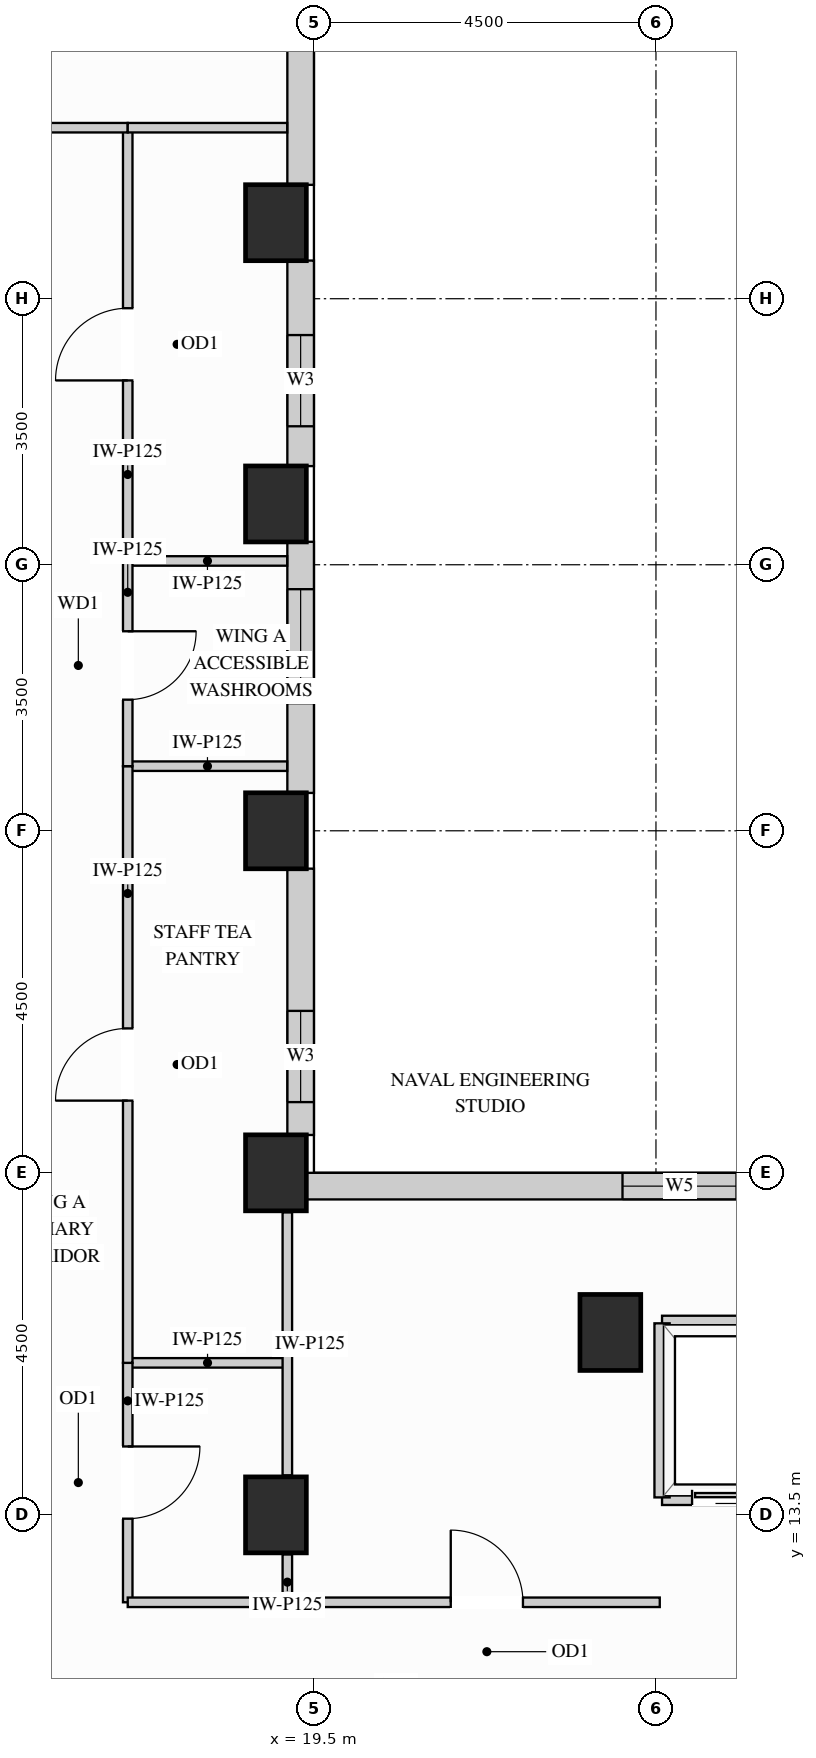
"""IFC4 building model, lengths in metres.
Left out: names, types, materials, properties, quantities, classifications, styles, units other than length and angle.
Written with IfcOpenShell. Run it as: python <this file> out.ifc"""

import sys

from ifc_helpers import new_model, si_unit, direction, frame, frame_2d, origin, origin_2d, place, context, subcontext, project, spatial, rectangle, extrude, source, transform, mapped, element, fill, save


model = new_model("IFC4")
c1 = context("Model", 3, precision=1e-05, world=origin(), true_north=direction((0.0, 1.0)))
c2 = subcontext(c1, "Body", "Model", "MODEL_VIEW")
j1 = project(units=[si_unit("LENGTHUNIT", "METRE"), si_unit("PLANEANGLEUNIT", "RADIAN")], contexts=[c1])
p1 = place(None, origin())
s1 = spatial("IfcSite", under=j1, at=p1, CompositionType="ELEMENT")
p2 = place(p1, origin())
s2 = spatial("IfcBuilding", under=s1, at=p2, CompositionType="ELEMENT")
p3 = place(p2, frame((0.0, 0.0, 150.3)))
s3 = spatial("IfcBuildingStorey", under=s2, at=p3, CompositionType="ELEMENT", Elevation=150.3)
m1 = source(origin(), c2, "Body", "SweptSolid", [
    extrude(rectangle(XDim=0.8, YDim=1.0, at=origin_2d()), origin(), (0.0, 0.0, 1.0), 3.4),
])
for number, where, z_axis, x_axis in (
    (1, (19.0, 13.5, 0.0), (0.0, 0.0, 1.0), (1.0, 0.0, 0.0)),
    (2, (19.0, 18.0, 0.0), (0.0, 0.0, 1.0), (1.0, 0.0, 0.0)),
    (3, (19.0, 22.5, 0.0), (0.0, 0.0, 1.0), (1.0, 0.0, 0.0)),
    (4, (19.0, 26.8, 0.0), (0.0, 0.0, 1.0), (1.0, 0.0, 0.0)),
    (5, (19.0, 30.5, 0.0), (0.0, 0.0, 1.0), (1.0, 0.0, 0.0)),
    (6, (23.4, 15.9, 0.0), (0.0, 0.0, 1.0), (1.0, 0.0, 0.0)),
):
    element("IfcColumn", number, at=place(p3, frame(where, z_axis=z_axis, x_axis=x_axis)), inside=s3, PredefinedType="COLUMN", context=c2, shape_type="MappedRepresentation", body=[
        mapped(m1, transform((0.0, 0.0, 0.0), x_axis=(1.0, 0.0, 0.0), y_axis=(0.0, 1.0, 0.0), z_axis=(0.0, 0.0, 1.0))),
    ])
p4 = place(p3, frame((34.502, 17.825, 0.0), z_axis=(0.0, 0.0, 1.0), x_axis=(-1.0, 0.0, 0.0)))
e7 = element("IfcWall", 7, at=p4, inside=s3, PredefinedType="SOLIDWALL", context=c2, shape_type="SweptSolid", body=[
    extrude(rectangle(XDim=15.104, YDim=0.35, at=frame_2d((7.552, 0.0))), origin(), (0.0, 0.0, 1.0), 3.385),
])
p5 = place(p4, frame((4.131, 0.0, 0.78)))
e8 = element("IfcOpeningElement", 8, at=p5, cuts=e7, PredefinedType="OPENING", context=c2, shape_type="SweptSolid", body=[
    extrude(rectangle(XDim=1.5, YDim=2.0, at=frame_2d((0.75, 1.0))), frame((0.0, 0.185, 0.0), z_axis=(0.0, -1.0, 0.0), x_axis=(1.0, 0.0, 0.0)), (0.0, 0.0, 1.0), 0.37),
])
p6 = place(p4, frame((9.442, 0.0, 0.78)))
e9 = element("IfcOpeningElement", 9, at=p6, cuts=e7, PredefinedType="OPENING", context=c2, shape_type="SweptSolid", body=[
    extrude(rectangle(XDim=1.5, YDim=2.0, at=frame_2d((0.75, 1.0))), frame((0.0, 0.185, 0.0), z_axis=(0.0, -1.0, 0.0), x_axis=(1.0, 0.0, 0.0)), (0.0, 0.0, 1.0), 0.37),
])
p7 = place(p3, frame((19.325, 18.498, 0.0), z_axis=(0.0, 0.0, 1.0), x_axis=(0.0, 1.0, 0.0)))
e10 = element("IfcWall", 10, at=p7, inside=s3, PredefinedType="SOLIDWALL", context=c2, shape_type="SweptSolid", body=[
    extrude(rectangle(XDim=3.504, YDim=0.35, at=frame_2d((1.752, 0.0))), origin(), (0.0, 0.0, 1.0), 2.612),
])
p8 = place(p7, frame((0.433, 0.0, 0.78)))
e11 = element("IfcOpeningElement", 11, at=p8, cuts=e10, PredefinedType="OPENING", context=c2, shape_type="SweptSolid", body=[
    extrude(rectangle(XDim=1.2, YDim=1.652, at=frame_2d((0.6, 0.826))), frame((0.0, 0.185, 0.0), z_axis=(0.0, -1.0, 0.0), x_axis=(1.0, 0.0, 0.0)), (0.0, 0.0, 1.0), 0.37),
])
p9 = place(p3, frame((19.325, 22.998, 0.0), z_axis=(0.0, 0.0, 1.0), x_axis=(0.0, 1.0, 0.0)))
e12 = element("IfcWall", 12, at=p9, inside=s3, PredefinedType="SOLIDWALL", context=c2, shape_type="SweptSolid", body=[
    extrude(rectangle(XDim=3.304, YDim=0.35, at=frame_2d((1.652, 0.0))), origin(), (0.0, 0.0, 1.0), 2.612),
])
p10 = place(p9, frame((1.18, 0.0, 0.78)))
e13 = element("IfcOpeningElement", 13, at=p10, cuts=e12, PredefinedType="OPENING", context=c2, shape_type="SweptSolid", body=[
    extrude(rectangle(XDim=1.5, YDim=1.652, at=frame_2d((0.75, 0.826))), frame((0.0, 0.185, 0.0), z_axis=(0.0, -1.0, 0.0), x_axis=(1.0, 0.0, 0.0)), (0.0, 0.0, 1.0), 0.37),
])
p11 = place(p3, frame((19.325, 27.298, 0.0), z_axis=(0.0, 0.0, 1.0), x_axis=(0.0, 1.0, 0.0)))
e14 = element("IfcWall", 14, at=p11, inside=s3, PredefinedType="SOLIDWALL", context=c2, shape_type="SweptSolid", body=[
    extrude(rectangle(XDim=2.704, YDim=0.35, at=frame_2d((1.352, 0.0))), origin(), (0.0, 0.0, 1.0), 2.612),
])
p12 = place(p11, frame((0.524, 0.0, 0.78)))
e15 = element("IfcOpeningElement", 15, at=p12, cuts=e14, PredefinedType="OPENING", context=c2, shape_type="SweptSolid", body=[
    extrude(rectangle(XDim=1.2, YDim=1.652, at=frame_2d((0.6, 0.826))), frame((0.0, 0.185, 0.0), z_axis=(0.0, -1.0, 0.0), x_axis=(1.0, 0.0, 0.0)), (0.0, 0.0, 1.0), 0.37),
])
m2 = source(origin(), c2, "Body", "SweptSolid", [
    extrude(rectangle(XDim=3.504, YDim=0.35, at=frame_2d((1.752, 0.0))), origin(), (0.0, 0.0, 1.0), 2.612),
])
p13 = place(p3, frame((19.325, 30.998, 0.0), z_axis=(0.0, 0.0, 1.0), x_axis=(0.0, 1.0, 0.0)))
e16 = element("IfcWall", 16, at=p13, inside=s3, PredefinedType="SOLIDWALL", context=c2, shape_type="MappedRepresentation", body=[
    mapped(m2, transform((0.0, 0.0, 0.0), x_axis=(1.0, 0.0, 0.0), y_axis=(0.0, 1.0, 0.0), z_axis=(0.0, 0.0, 1.0))),
])
m3 = source(origin(), c2, "Body", "SweptSolid", [
    extrude(rectangle(XDim=2.1, YDim=0.125, at=frame_2d((1.05, 0.0))), origin(), (0.0, 0.0, 1.0), 3.385),
])
p14 = place(p3, frame((17.05, 15.5, 0.0), z_axis=(0.0, 0.0, 1.0), x_axis=(1.0, 0.0, 0.0)))
e17 = element("IfcWall", 17, at=p14, inside=s3, PredefinedType="PARTITIONING", context=c2, shape_type="MappedRepresentation", body=[
    mapped(m3, transform((0.0, 0.0, 0.0), x_axis=(1.0, 0.0, 0.0), y_axis=(0.0, 1.0, 0.0), z_axis=(0.0, 0.0, 1.0))),
])
m4 = source(origin(), c2, "Body", "SweptSolid", [
    extrude(rectangle(XDim=2.098, YDim=0.125, at=frame_2d((1.049, 0.0))), origin(), (0.0, 0.0, 1.0), 3.385),
])
for number, where, z_axis, x_axis in (
    (18, (17.05, 23.35, 0.0), (0.0, 0.0, 1.0), (1.0, 0.0, 0.0)),
    (19, (17.05, 26.05, 0.0), (0.0, 0.0, 1.0), (1.0, 0.0, 0.0)),
):
    element("IfcWall", number, at=place(p3, frame(where, z_axis=z_axis, x_axis=x_axis)), inside=s3, PredefinedType="PARTITIONING", context=c2, shape_type="MappedRepresentation", body=[
        mapped(m4, transform((0.0, 0.0, 0.0), x_axis=(1.0, 0.0, 0.0), y_axis=(0.0, 1.0, 0.0), z_axis=(0.0, 0.0, 1.0))),
    ])
m5 = source(origin(), c2, "Body", "SweptSolid", [
    extrude(rectangle(XDim=0.63, YDim=0.125, at=frame_2d((0.315, 0.0))), origin(), (0.0, 0.0, 1.0), 2.773),
])
p15 = place(p3, frame((19.15, 12.35, 0.0), z_axis=(0.0, 0.0, 1.0), x_axis=(0.0, 1.0, 0.0)))
e20 = element("IfcWall", 20, at=p15, inside=s3, PredefinedType="PARTITIONING", context=c2, shape_type="MappedRepresentation", body=[
    mapped(m5, transform((0.0, 0.0, 0.0), x_axis=(1.0, 0.0, 0.0), y_axis=(0.0, 1.0, 0.0), z_axis=(0.0, 0.0, 1.0))),
])
m6 = source(origin(), c2, "Body", "SweptSolid", [
    extrude(rectangle(XDim=3.46, YDim=0.125, at=frame_2d((1.73, 0.0))), origin(), (0.0, 0.0, 1.0), 2.773),
])
p16 = place(p3, frame((19.15, 14.02, 0.0), z_axis=(0.0, 0.0, 1.0), x_axis=(0.0, 1.0, 0.0)))
e21 = element("IfcWall", 21, at=p16, inside=s3, PredefinedType="PARTITIONING", context=c2, shape_type="MappedRepresentation", body=[
    mapped(m6, transform((0.0, 0.0, 0.0), x_axis=(1.0, 0.0, 0.0), y_axis=(0.0, 1.0, 0.0), z_axis=(0.0, 0.0, 1.0))),
])
p17 = place(p3, frame((17.05, 12.35, 0.0), z_axis=(0.0, 0.0, 1.0), x_axis=(0.0, 1.0, 0.0)))
e22 = element("IfcWall", 22, at=p17, inside=s3, PredefinedType="PARTITIONING", context=c2, shape_type="SweptSolid", body=[
    extrude(rectangle(XDim=3.15, YDim=0.125, at=frame_2d((1.575, 0.0))), origin(), (0.0, 0.0, 1.0), 3.385),
])
p18 = place(p17, frame((1.1, 0.0, 0.0)))
e23 = element("IfcOpeningElement", 23, at=p18, cuts=e22, PredefinedType="OPENING", context=c2, shape_type="SweptSolid", body=[
    extrude(rectangle(XDim=0.95, YDim=2.15, at=frame_2d((0.475, 1.075))), frame((0.0, 0.073, 0.0), z_axis=(0.0, -1.0, 0.0), x_axis=(1.0, 0.0, 0.0)), (0.0, 0.0, 1.0), 0.145),
])
p19 = place(p3, frame((17.05, 15.5, 0.0), z_axis=(0.0, 0.0, 1.0), x_axis=(0.0, 1.0, 0.0)))
e24 = element("IfcWall", 24, at=p19, inside=s3, PredefinedType="PARTITIONING", context=c2, shape_type="SweptSolid", body=[
    extrude(rectangle(XDim=7.85, YDim=0.125, at=frame_2d((3.925, 0.0))), origin(), (0.0, 0.0, 1.0), 3.385),
])
p20 = place(p19, frame((3.45, 0.0, 0.0)))
e25 = element("IfcOpeningElement", 25, at=p20, cuts=e24, PredefinedType="OPENING", context=c2, shape_type="SweptSolid", body=[
    extrude(rectangle(XDim=0.95, YDim=2.15, at=frame_2d((0.475, 1.075))), frame((0.0, 0.073, 0.0), z_axis=(0.0, -1.0, 0.0), x_axis=(1.0, 0.0, 0.0)), (0.0, 0.0, 1.0), 0.145),
])
p21 = place(p3, frame((17.05, 26.05, 0.0), z_axis=(0.0, 0.0, 1.0), x_axis=(0.0, 1.0, 0.0)))
e26 = element("IfcWall", 26, at=p21, inside=s3, PredefinedType="PARTITIONING", context=c2, shape_type="SweptSolid", body=[
    extrude(rectangle(XDim=5.7, YDim=0.125, at=frame_2d((2.85, 0.0))), origin(), (0.0, 0.0, 1.0), 3.385),
])
p22 = place(p21, frame((2.375, 0.0, 0.0)))
e27 = element("IfcOpeningElement", 27, at=p22, cuts=e26, PredefinedType="OPENING", context=c2, shape_type="SweptSolid", body=[
    extrude(rectangle(XDim=0.95, YDim=2.15, at=frame_2d((0.475, 1.075))), frame((0.0, 0.073, 0.0), z_axis=(0.0, -1.0, 0.0), x_axis=(1.0, 0.0, 0.0)), (0.0, 0.0, 1.0), 0.145),
])
p23 = place(p3, frame((17.05, 23.35, 0.0), z_axis=(0.0, 0.0, 1.0), x_axis=(0.0, 1.0, 0.0)))
e28 = element("IfcWall", 28, at=p23, inside=s3, PredefinedType="PARTITIONING", context=c2, shape_type="SweptSolid", body=[
    extrude(rectangle(XDim=2.7, YDim=0.125, at=frame_2d((1.35, 0.0))), origin(), (0.0, 0.0, 1.0), 3.385),
])
p24 = place(p23, frame((0.875, 0.0, 0.0)))
e29 = element("IfcOpeningElement", 29, at=p24, cuts=e28, PredefinedType="OPENING", context=c2, shape_type="SweptSolid", body=[
    extrude(rectangle(XDim=0.9, YDim=2.15, at=frame_2d((0.45, 1.075))), frame((0.0, 0.073, 0.0), z_axis=(0.0, -1.0, 0.0), x_axis=(1.0, 0.0, 0.0)), (0.0, 0.0, 1.0), 0.145),
])
p25 = place(p3, frame((11.916, 31.75, 0.0), z_axis=(0.0, 0.0, 1.0), x_axis=(1.0, 0.0, 0.0)))
e30 = element("IfcWall", 30, at=p25, inside=s3, PredefinedType="PARTITIONING", context=c2, shape_type="SweptSolid", body=[
    extrude(rectangle(XDim=5.134, YDim=0.125, at=frame_2d((2.567, 0.0))), origin(), (0.0, 0.0, 1.0), 2.848),
])
p26 = place(p25, frame((2.092, 0.0, 0.0)))
e31 = element("IfcOpeningElement", 31, at=p26, cuts=e30, PredefinedType="OPENING", context=c2, shape_type="SweptSolid", body=[
    extrude(rectangle(XDim=0.95, YDim=2.15, at=frame_2d((0.475, 1.075))), frame((0.0, 0.073, 0.0), z_axis=(0.0, -1.0, 0.0), x_axis=(1.0, 0.0, 0.0)), (0.0, 0.0, 1.0), 0.145),
])
m7 = source(origin(), c2, "Body", "SweptSolid", [
    extrude(rectangle(XDim=2.098, YDim=0.125, at=frame_2d((1.049, 0.0))), origin(), (0.0, 0.0, 1.0), 2.848),
])
p27 = place(p3, frame((17.05, 31.75, 0.0), z_axis=(0.0, 0.0, 1.0), x_axis=(1.0, 0.0, 0.0)))
e32 = element("IfcWall", 32, at=p27, inside=s3, PredefinedType="PARTITIONING", context=c2, shape_type="MappedRepresentation", body=[
    mapped(m7, transform((0.0, 0.0, 0.0), x_axis=(1.0, 0.0, 0.0), y_axis=(0.0, 1.0, 0.0), z_axis=(0.0, 0.0, 1.0))),
])
m8 = source(origin(), c2, "Body", "SweptSolid", [
    extrude(rectangle(XDim=2.45, YDim=0.125, at=frame_2d((1.225, 0.0))), origin(), (0.0, 0.0, 1.0), 3.385),
])
p28 = place(p3, frame((17.05, 12.35, 0.0), z_axis=(0.0, 0.0, 1.0), x_axis=(1.0, 0.0, 0.0)))
e33 = element("IfcWall", 33, at=p28, inside=s3, PredefinedType="PARTITIONING", context=c2, shape_type="MappedRepresentation", body=[
    mapped(m8, transform((0.0, 0.0, 0.0), x_axis=(1.0, 0.0, 0.0), y_axis=(0.0, 1.0, 0.0), z_axis=(0.0, 0.0, 1.0))),
])
p29 = place(p3, frame((19.5, 12.35, 0.0), z_axis=(0.0, 0.0, 1.0), x_axis=(1.0, 0.0, 0.0)))
e34 = element("IfcWall", 34, at=p29, inside=s3, PredefinedType="PARTITIONING", context=c2, shape_type="SweptSolid", body=[
    extrude(rectangle(XDim=4.55, YDim=0.125, at=frame_2d((2.275, 0.0))), origin(), (0.0, 0.0, 1.0), 3.385),
])
p30 = place(p29, frame((1.8, 0.0, 0.0)))
e35 = element("IfcOpeningElement", 35, at=p30, cuts=e34, PredefinedType="OPENING", context=c2, shape_type="SweptSolid", body=[
    extrude(rectangle(XDim=0.95, YDim=2.15, at=frame_2d((0.475, 1.075))), frame((0.0, 0.073, 0.0), z_axis=(0.0, -1.0, 0.0), x_axis=(1.0, 0.0, 0.0)), (0.0, 0.0, 1.0), 0.145),
])
m9 = source(origin(), c2, "Body", "SweptSolid", [
    extrude(rectangle(XDim=1.89, YDim=0.2, at=frame_2d((0.945, 0.0))), origin(), (0.0, 0.0, 1.0), 2.773),
])
p31 = place(p3, frame((24.08, 16.02, 0.0), z_axis=(0.0, 0.0, 1.0), x_axis=(1.0, 0.0, 0.0)))
e36 = element("IfcWall", 36, at=p31, inside=s3, PredefinedType="PARTITIONING", context=c2, shape_type="MappedRepresentation", body=[
    mapped(m9, transform((0.0, 0.0, 0.0), x_axis=(1.0, 0.0, 0.0), y_axis=(0.0, 1.0, 0.0), z_axis=(0.0, 0.0, 1.0))),
])
p32 = place(p3, frame((24.08, 13.73, 0.0), z_axis=(0.0, 0.0, 1.0), x_axis=(1.0, 0.0, 0.0)))
e37 = element("IfcWall", 37, at=p32, inside=s3, PredefinedType="PARTITIONING", context=c2, shape_type="SweptSolid", body=[
    extrude(rectangle(XDim=1.89, YDim=0.2, at=frame_2d((0.945, 0.0))), origin(), (0.0, 0.0, 1.0), 2.466),
])
p33 = place(p32, frame((0.395, 0.0, 0.0)))
e38 = element("IfcOpeningElement", 38, at=p33, cuts=e37, PredefinedType="OPENING", context=c2, shape_type="SweptSolid", body=[
    extrude(rectangle(XDim=1.1, YDim=2.2, at=frame_2d((0.55, 1.1))), frame((0.0, 0.11, 0.0), z_axis=(0.0, -1.0, 0.0), x_axis=(1.0, 0.0, 0.0)), (0.0, 0.0, 1.0), 0.22),
])
m10 = source(origin(), c2, "Body", "SweptSolid", [
    extrude(rectangle(XDim=2.29, YDim=0.2, at=frame_2d((1.145, 0.0))), origin(), (0.0, 0.0, 1.0), 3.385),
])
p34 = place(p3, frame((24.08, 13.73, 0.0), z_axis=(0.0, 0.0, 1.0), x_axis=(0.0, 1.0, 0.0)))
e39 = element("IfcWall", 39, at=p34, inside=s3, PredefinedType="PARTITIONING", context=c2, shape_type="MappedRepresentation", body=[
    mapped(m10, transform((0.0, 0.0, 0.0), x_axis=(1.0, 0.0, 0.0), y_axis=(0.0, 1.0, 0.0), z_axis=(0.0, 0.0, 1.0))),
])
m11 = source(origin(), c2, "Body", "SweptSolid", [
    extrude(rectangle(XDim=1.1, YDim=2.2, at=frame_2d((0.55, 1.1))), frame((0.0, 0.025, 0.0), z_axis=(0.0, -1.0, 0.0), x_axis=(1.0, 0.0, 0.0)), (0.0, 0.0, 1.0), 0.05),
])
p35 = place(p33, origin())
e40 = element("IfcDoor", 40, at=p35, inside=s3, OperationType="SLIDING_TO_LEFT", PredefinedType="DOOR", context=c2, shape_type="MappedRepresentation", body=[
    mapped(m11, transform((0.0, 0.0, 0.0), x_axis=(1.0, 0.0, 0.0), y_axis=(0.0, 1.0, 0.0), z_axis=(0.0, 0.0, 1.0))),
])
fill(e38, e40)
m12 = source(origin(), c2, "Body", "SweptSolid", [
    extrude(rectangle(XDim=0.95, YDim=2.15, at=frame_2d((0.475, 1.075))), frame((0.0, 0.025, 0.0), z_axis=(0.0, -1.0, 0.0), x_axis=(1.0, 0.0, 0.0)), (0.0, 0.0, 1.0), 0.05),
])
p36 = place(p18, origin())
e41 = element("IfcDoor", 41, at=p36, inside=s3, OperationType="SINGLE_SWING_RIGHT", PredefinedType="DOOR", context=c2, shape_type="MappedRepresentation", body=[
    mapped(m12, transform((0.0, 0.0, 0.0), x_axis=(1.0, 0.0, 0.0), y_axis=(0.0, 1.0, 0.0), z_axis=(0.0, 0.0, 1.0))),
])
fill(e23, e41)
p37 = place(p20, origin())
e42 = element("IfcDoor", 42, at=p37, inside=s3, OperationType="SINGLE_SWING_LEFT", PredefinedType="DOOR", context=c2, shape_type="MappedRepresentation", body=[
    mapped(m12, transform((0.0, 0.0, 0.0), x_axis=(1.0, 0.0, 0.0), y_axis=(0.0, 1.0, 0.0), z_axis=(0.0, 0.0, 1.0))),
])
fill(e25, e42)
p38 = place(p22, origin())
e43 = element("IfcDoor", 43, at=p38, inside=s3, OperationType="SINGLE_SWING_LEFT", PredefinedType="DOOR", context=c2, shape_type="MappedRepresentation", body=[
    mapped(m12, transform((0.0, 0.0, 0.0), x_axis=(1.0, 0.0, 0.0), y_axis=(0.0, 1.0, 0.0), z_axis=(0.0, 0.0, 1.0))),
])
fill(e27, e43)
p39 = place(p30, origin())
e44 = element("IfcDoor", 44, at=p39, inside=s3, OperationType="SINGLE_SWING_LEFT", PredefinedType="DOOR", context=c2, shape_type="MappedRepresentation", body=[
    mapped(m12, transform((0.0, 0.0, 0.0), x_axis=(1.0, 0.0, 0.0), y_axis=(0.0, 1.0, 0.0), z_axis=(0.0, 0.0, 1.0))),
])
fill(e35, e44)
m13 = source(origin(), c2, "Body", "SweptSolid", [
    extrude(rectangle(XDim=0.9, YDim=2.15, at=frame_2d((0.45, 1.075))), frame((0.0, 0.025, 0.0), z_axis=(0.0, -1.0, 0.0), x_axis=(1.0, 0.0, 0.0)), (0.0, 0.0, 1.0), 0.05),
])
p40 = place(p24, origin())
e45 = element("IfcDoor", 45, at=p40, inside=s3, OperationType="SINGLE_SWING_RIGHT", PredefinedType="DOOR", context=c2, shape_type="MappedRepresentation", body=[
    mapped(m13, transform((0.0, 0.0, 0.0), x_axis=(1.0, 0.0, 0.0), y_axis=(0.0, 1.0, 0.0), z_axis=(0.0, 0.0, 1.0))),
])
fill(e29, e45)
m14 = source(origin(), c2, "Body", "SweptSolid", [
    extrude(rectangle(XDim=1.2, YDim=1.652, at=frame_2d((0.6, 0.826))), frame((0.0, 0.03, 0.0), z_axis=(0.0, -1.0, 0.0), x_axis=(1.0, 0.0, 0.0)), (0.0, 0.0, 1.0), 0.06),
])
p41 = place(p8, origin())
e46 = element("IfcWindow", 46, at=p41, inside=s3, PartitioningType="SINGLE_PANEL", PredefinedType="WINDOW", context=c2, shape_type="MappedRepresentation", body=[
    mapped(m14, transform((0.0, 0.0, 0.0), x_axis=(1.0, 0.0, 0.0), y_axis=(0.0, 1.0, 0.0), z_axis=(0.0, 0.0, 1.0))),
])
fill(e11, e46)
p42 = place(p12, origin())
e47 = element("IfcWindow", 47, at=p42, inside=s3, PartitioningType="SINGLE_PANEL", PredefinedType="WINDOW", context=c2, shape_type="MappedRepresentation", body=[
    mapped(m14, transform((0.0, 0.0, 0.0), x_axis=(1.0, 0.0, 0.0), y_axis=(0.0, 1.0, 0.0), z_axis=(0.0, 0.0, 1.0))),
])
fill(e15, e47)
m15 = source(origin(), c2, "Body", "SweptSolid", [
    extrude(rectangle(XDim=1.5, YDim=2.0, at=frame_2d((0.75, 1.0))), frame((0.0, 0.03, 0.0), z_axis=(0.0, -1.0, 0.0), x_axis=(1.0, 0.0, 0.0)), (0.0, 0.0, 1.0), 0.06),
])
p43 = place(p6, origin())
e48 = element("IfcWindow", 48, at=p43, inside=s3, PartitioningType="SINGLE_PANEL", PredefinedType="WINDOW", context=c2, shape_type="MappedRepresentation", body=[
    mapped(m15, transform((0.0, 0.0, 0.0), x_axis=(1.0, 0.0, 0.0), y_axis=(0.0, 1.0, 0.0), z_axis=(0.0, 0.0, 1.0))),
])
fill(e9, e48)
m16 = source(origin(), c2, "Body", "SweptSolid", [
    extrude(rectangle(XDim=1.5, YDim=1.652, at=frame_2d((0.75, 0.826))), frame((0.0, 0.03, 0.0), z_axis=(0.0, -1.0, 0.0), x_axis=(1.0, 0.0, 0.0)), (0.0, 0.0, 1.0), 0.06),
])
p44 = place(p10, origin())
e49 = element("IfcWindow", 49, at=p44, inside=s3, PartitioningType="SINGLE_PANEL", PredefinedType="WINDOW", context=c2, shape_type="MappedRepresentation", body=[
    mapped(m16, transform((0.0, 0.0, 0.0), x_axis=(1.0, 0.0, 0.0), y_axis=(0.0, 1.0, 0.0), z_axis=(0.0, 0.0, 1.0))),
])
fill(e13, e49)
save(model, sys.argv[1])
